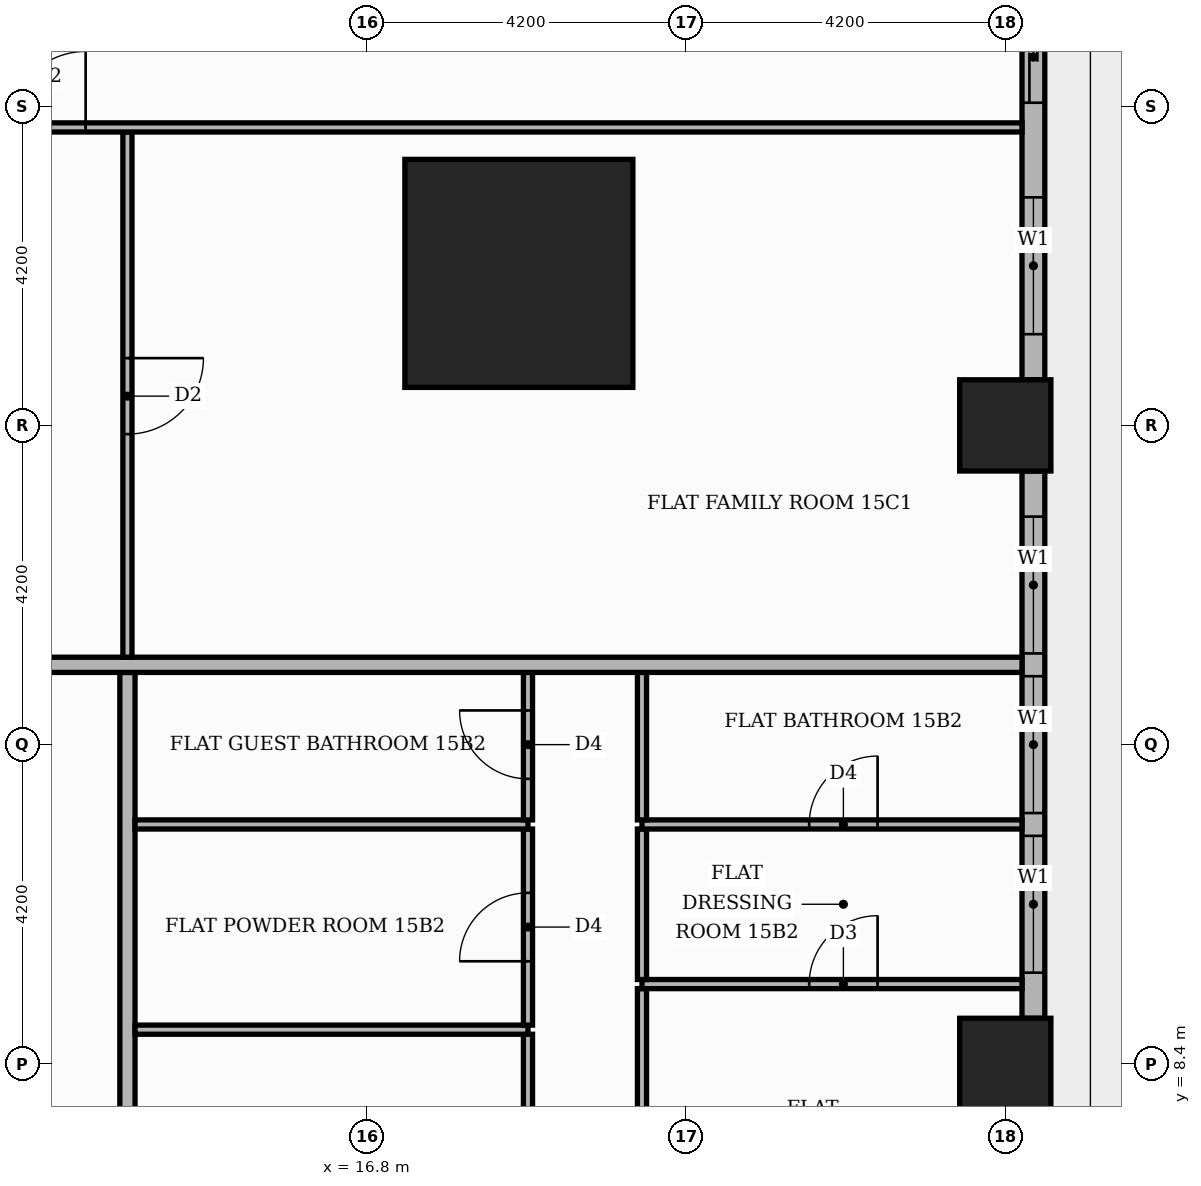
"""IFC4 building model, lengths in metres.
Left out: names, types, materials, properties, quantities, classifications, styles, units other than length and angle.
Written with IfcOpenShell. Run it as: python <this file> out.ifc"""

import sys

from ifc_helpers import new_model, si_unit, direction, frame, frame_2d, origin, origin_2d, place, context, subcontext, project, spatial, rectangle, extrude, element, fill, save


model = new_model("IFC4")
c1 = context("Model", 3, precision=1e-05, world=origin(), true_north=direction((0.0, 1.0)))
c2 = subcontext(c1, "Body", "Model", "MODEL_VIEW")
j1 = project(units=[si_unit("LENGTHUNIT", "METRE"), si_unit("PLANEANGLEUNIT", "RADIAN")], contexts=[c1])
p1 = place(None, origin())
s1 = spatial("IfcSite", under=j1, at=p1, CompositionType="ELEMENT")
p2 = place(p1, origin())
s2 = spatial("IfcBuilding", under=s1, at=p2, CompositionType="ELEMENT")
p3 = place(p2, frame((0.0, 0.0, 66.0)))
s3 = spatial("IfcBuildingStorey", under=s2, at=p3, CompositionType="ELEMENT", Elevation=66.0)
p4 = place(p3, frame((18.8, 18.8, 0.0), z_axis=(0.0, 0.0, 1.0), x_axis=(1.0, 0.0, 0.0)))
e1 = element("IfcColumn", 1, at=p4, inside=s3, PredefinedType="COLUMN", context=c2, shape_type="SweptSolid", body=[
    extrude(rectangle(XDim=3.0, YDim=3.0, at=origin_2d()), origin(), (0.0, 0.0, 1.0), 3.9),
])
for number, where, z_axis, x_axis in (
    (2, (25.2, 8.4, 0.0), (0.0, 0.0, 1.0), (1.0, 0.0, 0.0)),
    (3, (25.2, 16.8, 0.0), (0.0, 0.0, 1.0), (1.0, 0.0, 0.0)),
):
    element("IfcColumn", number, at=place(p3, frame(where, z_axis=z_axis, x_axis=x_axis)), inside=s3, PredefinedType="COLUMN", context=c2, shape_type="SweptSolid", body=[
        extrude(rectangle(XDim=1.2, YDim=1.2, at=origin_2d()), origin(), (0.0, 0.0, 1.0), 3.9),
    ])
p5 = place(p3, frame((25.57, 9.0, 0.0), z_axis=(0.0, 0.0, 1.0), x_axis=(0.0, 1.0, 0.0)))
e4 = element("IfcWall", 4, at=p5, inside=s3, PredefinedType="STANDARD", context=c2, shape_type="SweptSolid", body=[
    extrude(rectangle(XDim=7.2, YDim=0.3, at=frame_2d((3.6, 0.0))), origin(), (0.0, 0.0, 1.0), 3.48),
])
p6 = place(p5, frame((0.6, 0.0, 0.9)))
e5 = element("IfcOpeningElement", 5, at=p6, cuts=e4, PredefinedType="OPENING", context=c2, shape_type="SweptSolid", body=[
    extrude(rectangle(XDim=1.8, YDim=2.1, at=frame_2d((0.9, 1.05))), frame((0.0, 0.16, 0.0), z_axis=(0.0, -1.0, 0.0), x_axis=(1.0, 0.0, 0.0)), (0.0, 0.0, 1.0), 0.32),
])
p7 = place(p5, frame((2.7, 0.0, 0.9)))
e6 = element("IfcOpeningElement", 6, at=p7, cuts=e4, PredefinedType="OPENING", context=c2, shape_type="SweptSolid", body=[
    extrude(rectangle(XDim=1.8, YDim=2.1, at=frame_2d((0.9, 1.05))), frame((0.0, 0.16, 0.0), z_axis=(0.0, -1.0, 0.0), x_axis=(1.0, 0.0, 0.0)), (0.0, 0.0, 1.0), 0.32),
])
p8 = place(p5, frame((4.8, 0.0, 0.9)))
e7 = element("IfcOpeningElement", 7, at=p8, cuts=e4, PredefinedType="OPENING", context=c2, shape_type="SweptSolid", body=[
    extrude(rectangle(XDim=1.8, YDim=2.1, at=frame_2d((0.9, 1.05))), frame((0.0, 0.16, 0.0), z_axis=(0.0, -1.0, 0.0), x_axis=(1.0, 0.0, 0.0)), (0.0, 0.0, 1.0), 0.32),
])
p9 = place(p3, frame((25.57, 17.4, 0.0), z_axis=(0.0, 0.0, 1.0), x_axis=(0.0, 1.0, 0.0)))
e8 = element("IfcWall", 8, at=p9, inside=s3, PredefinedType="STANDARD", context=c2, shape_type="SweptSolid", body=[
    extrude(rectangle(XDim=5.32, YDim=0.3, at=frame_2d((2.66, 0.0))), origin(), (0.0, 0.0, 1.0), 3.48),
])
p10 = place(p9, frame((0.6, 0.0, 0.9)))
e9 = element("IfcOpeningElement", 9, at=p10, cuts=e8, PredefinedType="OPENING", context=c2, shape_type="SweptSolid", body=[
    extrude(rectangle(XDim=1.8, YDim=2.1, at=frame_2d((0.9, 1.05))), frame((0.0, 0.16, 0.0), z_axis=(0.0, -1.0, 0.0), x_axis=(1.0, 0.0, 0.0)), (0.0, 0.0, 1.0), 0.32),
])
p11 = place(p9, frame((3.645, 0.0, 0.0)))
e10 = element("IfcOpeningElement", 10, at=p11, cuts=e8, PredefinedType="OPENING", context=c2, shape_type="SweptSolid", body=[
    extrude(rectangle(XDim=1.2, YDim=2.4, at=frame_2d((0.6, 1.2))), frame((0.0, 0.16, 0.0), z_axis=(0.0, -1.0, 0.0), x_axis=(1.0, 0.0, 0.0)), (0.0, 0.0, 1.0), 0.32),
])
p12 = place(p3, frame((13.65, -5.15, 0.0), z_axis=(0.0, 0.0, 1.0), x_axis=(0.0, 1.0, 0.0)))
e11 = element("IfcWall", 11, at=p12, inside=s3, PredefinedType="PARTITIONING", context=c2, shape_type="SweptSolid", body=[
    extrude(rectangle(XDim=18.7, YDim=0.2, at=frame_2d((9.35, 0.0))), origin(), (0.0, 0.0, 1.0), 3.48),
])
p13 = place(p12, frame((5.65, 0.0, 0.0)))
e12 = element("IfcOpeningElement", 12, at=p13, cuts=e11, PredefinedType="OPENING", context=c2, shape_type="SweptSolid", body=[
    extrude(rectangle(XDim=1.1, YDim=2.4, at=frame_2d((0.55, 1.2))), frame((0.0, 0.11, 0.0), z_axis=(0.0, -1.0, 0.0), x_axis=(1.0, 0.0, 0.0)), (0.0, 0.0, 1.0), 0.22),
])
p14 = place(p3, frame((18.92, 3.21, 0.0), z_axis=(0.0, 0.0, 1.0), x_axis=(0.0, 1.0, 0.0)))
e13 = element("IfcWall", 13, at=p14, inside=s3, PredefinedType="PARTITIONING", context=c2, shape_type="SweptSolid", body=[
    extrude(rectangle(XDim=5.58, YDim=0.12, at=frame_2d((2.79, 0.0))), origin(), (0.0, 0.0, 1.0), 3.48),
])
p15 = place(p14, frame((2.34, 0.0, 0.0)))
e14 = element("IfcOpeningElement", 14, at=p15, cuts=e13, PredefinedType="OPENING", context=c2, shape_type="SweptSolid", body=[
    extrude(rectangle(XDim=0.9, YDim=2.1, at=frame_2d((0.45, 1.05))), frame((0.0, 0.07, 0.0), z_axis=(0.0, -1.0, 0.0), x_axis=(1.0, 0.0, 0.0)), (0.0, 0.0, 1.0), 0.14),
])
p16 = place(p3, frame((20.42, 5.31, 0.0), z_axis=(0.0, 0.0, 1.0), x_axis=(0.0, 1.0, 0.0)))
e15 = element("IfcWall", 15, at=p16, inside=s3, PredefinedType="PARTITIONING", context=c2, shape_type="SweptSolid", body=[
    extrude(rectangle(XDim=4.08, YDim=0.12, at=frame_2d((2.04, 0.0))), origin(), (0.0, 0.0, 1.0), 3.48),
])
p17 = place(p16, frame((1.59, 0.0, 0.0)))
e16 = element("IfcOpeningElement", 16, at=p17, cuts=e15, PredefinedType="OPENING", context=c2, shape_type="SweptSolid", body=[
    extrude(rectangle(XDim=0.9, YDim=2.1, at=frame_2d((0.45, 1.05))), frame((0.0, 0.07, 0.0), z_axis=(0.0, -1.0, 0.0), x_axis=(1.0, 0.0, 0.0)), (0.0, 0.0, 1.0), 0.14),
])
p18 = place(p3, frame((13.75, 8.85, 0.0), z_axis=(0.0, 0.0, 1.0), x_axis=(1.0, 0.0, 0.0)))
e17 = element("IfcWall", 17, at=p18, inside=s3, PredefinedType="PARTITIONING", context=c2, shape_type="SweptSolid", body=[
    extrude(rectangle(XDim=5.17, YDim=0.12, at=frame_2d((2.585, 0.0))), origin(), (0.0, 0.0, 1.0), 3.48),
])
p19 = place(p3, frame((18.92, 8.91, 0.0), z_axis=(0.0, 0.0, 1.0), x_axis=(0.0, 1.0, 0.0)))
e18 = element("IfcWall", 18, at=p19, inside=s3, PredefinedType="PARTITIONING", context=c2, shape_type="SweptSolid", body=[
    extrude(rectangle(XDim=2.58, YDim=0.12, at=frame_2d((1.29, 0.0))), origin(), (0.0, 0.0, 1.0), 3.48),
])
p20 = place(p19, frame((0.84, 0.0, 0.0)))
e19 = element("IfcOpeningElement", 19, at=p20, cuts=e18, PredefinedType="OPENING", context=c2, shape_type="SweptSolid", body=[
    extrude(rectangle(XDim=0.9, YDim=2.1, at=frame_2d((0.45, 1.05))), frame((0.0, 0.07, 0.0), z_axis=(0.0, -1.0, 0.0), x_axis=(1.0, 0.0, 0.0)), (0.0, 0.0, 1.0), 0.14),
])
p21 = place(p3, frame((20.42, 9.45, 0.0), z_axis=(0.0, 0.0, 1.0), x_axis=(1.0, 0.0, 0.0)))
e20 = element("IfcWall", 20, at=p21, inside=s3, PredefinedType="PARTITIONING", context=c2, shape_type="SweptSolid", body=[
    extrude(rectangle(XDim=5.0, YDim=0.12, at=frame_2d((2.5, 0.0))), origin(), (0.0, 0.0, 1.0), 3.48),
])
p22 = place(p21, frame((2.2, 0.0, 0.0)))
e21 = element("IfcOpeningElement", 21, at=p22, cuts=e20, PredefinedType="OPENING", context=c2, shape_type="SweptSolid", body=[
    extrude(rectangle(XDim=0.9, YDim=2.1, at=frame_2d((0.45, 1.05))), frame((0.0, 0.07, 0.0), z_axis=(0.0, -1.0, 0.0), x_axis=(1.0, 0.0, 0.0)), (0.0, 0.0, 1.0), 0.14),
])
p23 = place(p3, frame((20.42, 9.51, 0.0), z_axis=(0.0, 0.0, 1.0), x_axis=(0.0, 1.0, 0.0)))
e22 = element("IfcWall", 22, at=p23, inside=s3, PredefinedType="PARTITIONING", context=c2, shape_type="SweptSolid", body=[
    extrude(rectangle(XDim=1.98, YDim=0.12, at=frame_2d((0.99, 0.0))), origin(), (0.0, 0.0, 1.0), 3.48),
])
p24 = place(p3, frame((13.75, 11.55, 0.0), z_axis=(0.0, 0.0, 1.0), x_axis=(1.0, 0.0, 0.0)))
e23 = element("IfcWall", 23, at=p24, inside=s3, PredefinedType="PARTITIONING", context=c2, shape_type="SweptSolid", body=[
    extrude(rectangle(XDim=5.17, YDim=0.12, at=frame_2d((2.585, 0.0))), origin(), (0.0, 0.0, 1.0), 3.48),
])
p25 = place(p3, frame((20.42, 11.55, 0.0), z_axis=(0.0, 0.0, 1.0), x_axis=(1.0, 0.0, 0.0)))
e24 = element("IfcWall", 24, at=p25, inside=s3, PredefinedType="PARTITIONING", context=c2, shape_type="SweptSolid", body=[
    extrude(rectangle(XDim=5.0, YDim=0.12, at=frame_2d((2.5, 0.0))), origin(), (0.0, 0.0, 1.0), 3.48),
])
p26 = place(p25, frame((2.2, 0.0, 0.0)))
e25 = element("IfcOpeningElement", 25, at=p26, cuts=e24, PredefinedType="OPENING", context=c2, shape_type="SweptSolid", body=[
    extrude(rectangle(XDim=0.9, YDim=2.1, at=frame_2d((0.45, 1.05))), frame((0.0, 0.07, 0.0), z_axis=(0.0, -1.0, 0.0), x_axis=(1.0, 0.0, 0.0)), (0.0, 0.0, 1.0), 0.14),
])
p27 = place(p3, frame((18.92, 11.61, 0.0), z_axis=(0.0, 0.0, 1.0), x_axis=(0.0, 1.0, 0.0)))
e26 = element("IfcWall", 26, at=p27, inside=s3, PredefinedType="PARTITIONING", context=c2, shape_type="SweptSolid", body=[
    extrude(rectangle(XDim=1.94, YDim=0.12, at=frame_2d((0.97, 0.0))), origin(), (0.0, 0.0, 1.0), 3.48),
])
p28 = place(p27, frame((0.54, 0.0, 0.0)))
e27 = element("IfcOpeningElement", 27, at=p28, cuts=e26, PredefinedType="OPENING", context=c2, shape_type="SweptSolid", body=[
    extrude(rectangle(XDim=0.9, YDim=2.1, at=frame_2d((0.45, 1.05))), frame((0.0, 0.07, 0.0), z_axis=(0.0, -1.0, 0.0), x_axis=(1.0, 0.0, 0.0)), (0.0, 0.0, 1.0), 0.14),
])
p29 = place(p3, frame((20.42, 11.61, 0.0), z_axis=(0.0, 0.0, 1.0), x_axis=(0.0, 1.0, 0.0)))
e28 = element("IfcWall", 28, at=p29, inside=s3, PredefinedType="PARTITIONING", context=c2, shape_type="SweptSolid", body=[
    extrude(rectangle(XDim=1.94, YDim=0.12, at=frame_2d((0.97, 0.0))), origin(), (0.0, 0.0, 1.0), 3.48),
])
p30 = place(p3, frame((-13.65, 13.65, 0.0), z_axis=(0.0, 0.0, 1.0), x_axis=(1.0, 0.0, 0.0)))
e29 = element("IfcWall", 29, at=p30, inside=s3, PredefinedType="PARTITIONING", context=c2, shape_type="SweptSolid", body=[
    extrude(rectangle(XDim=39.07, YDim=0.2, at=frame_2d((19.535, 0.0))), origin(), (0.0, 0.0, 1.0), 3.48),
])
p31 = place(p30, frame((23.6, 0.0, 0.0)))
e30 = element("IfcOpeningElement", 30, at=p31, cuts=e29, PredefinedType="OPENING", context=c2, shape_type="SweptSolid", body=[
    extrude(rectangle(XDim=1.1, YDim=2.4, at=frame_2d((0.55, 1.2))), frame((0.0, 0.11, 0.0), z_axis=(0.0, -1.0, 0.0), x_axis=(1.0, 0.0, 0.0)), (0.0, 0.0, 1.0), 0.22),
])
p32 = place(p3, frame((13.65, 13.75, 0.0), z_axis=(0.0, 0.0, 1.0), x_axis=(0.0, 1.0, 0.0)))
e31 = element("IfcWall", 31, at=p32, inside=s3, PredefinedType="PARTITIONING", context=c2, shape_type="SweptSolid", body=[
    extrude(rectangle(XDim=6.91, YDim=0.12, at=frame_2d((3.455, 0.0))), origin(), (0.0, 0.0, 1.0), 3.48),
])
p33 = place(p32, frame((2.935, 0.0, 0.0)))
e32 = element("IfcOpeningElement", 32, at=p33, cuts=e31, PredefinedType="OPENING", context=c2, shape_type="SweptSolid", body=[
    extrude(rectangle(XDim=1.0, YDim=2.1, at=frame_2d((0.5, 1.05))), frame((0.0, 0.07, 0.0), z_axis=(0.0, -1.0, 0.0), x_axis=(1.0, 0.0, 0.0)), (0.0, 0.0, 1.0), 0.14),
])
p34 = place(p3, frame((-13.55, 20.72, 0.0), z_axis=(0.0, 0.0, 1.0), x_axis=(1.0, 0.0, 0.0)))
e33 = element("IfcWall", 33, at=p34, inside=s3, PredefinedType="PARTITIONING", context=c2, shape_type="SweptSolid", body=[
    extrude(rectangle(XDim=38.97, YDim=0.12, at=frame_2d((19.485, 0.0))), origin(), (0.0, 0.0, 1.0), 3.48),
])
p35 = place(p34, frame((25.65, 0.0, 0.0)))
e34 = element("IfcOpeningElement", 34, at=p35, cuts=e33, PredefinedType="OPENING", context=c2, shape_type="SweptSolid", body=[
    extrude(rectangle(XDim=1.0, YDim=2.1, at=frame_2d((0.5, 1.05))), frame((0.0, 0.07, 0.0), z_axis=(0.0, -1.0, 0.0), x_axis=(1.0, 0.0, 0.0)), (0.0, 0.0, 1.0), 0.14),
])
p36 = place(p34, frame((20.45, 0.0, 0.0)))
e35 = element("IfcOpeningElement", 35, at=p36, cuts=e33, PredefinedType="OPENING", context=c2, shape_type="SweptSolid", body=[
    extrude(rectangle(XDim=0.9, YDim=2.1, at=frame_2d((0.45, 1.05))), frame((0.0, 0.07, 0.0), z_axis=(0.0, -1.0, 0.0), x_axis=(1.0, 0.0, 0.0)), (0.0, 0.0, 1.0), 0.14),
])
p37 = place(p34, frame((9.95, 0.0, 0.0)))
e36 = element("IfcOpeningElement", 36, at=p37, cuts=e33, PredefinedType="OPENING", context=c2, shape_type="SweptSolid", body=[
    extrude(rectangle(XDim=0.9, YDim=2.1, at=frame_2d((0.45, 1.05))), frame((0.0, 0.07, 0.0), z_axis=(0.0, -1.0, 0.0), x_axis=(1.0, 0.0, 0.0)), (0.0, 0.0, 1.0), 0.14),
])
p38 = place(p34, frame((2.6, 0.0, 0.0)))
e37 = element("IfcOpeningElement", 37, at=p38, cuts=e33, PredefinedType="OPENING", context=c2, shape_type="SweptSolid", body=[
    extrude(rectangle(XDim=0.9, YDim=2.1, at=frame_2d((0.45, 1.05))), frame((0.0, 0.07, 0.0), z_axis=(0.0, -1.0, 0.0), x_axis=(1.0, 0.0, 0.0)), (0.0, 0.0, 1.0), 0.14),
])
p39 = place(p6, origin())
e38 = element("IfcWindow", 38, at=p39, inside=s3, PartitioningType="SINGLE_PANEL", PredefinedType="WINDOW", context=c2, shape_type="SweptSolid", body=[
    extrude(rectangle(XDim=1.8, YDim=2.1, at=frame_2d((0.9, 1.05))), frame((0.0, 0.03, 0.0), z_axis=(0.0, -1.0, 0.0), x_axis=(1.0, 0.0, 0.0)), (0.0, 0.0, 1.0), 0.06),
])
fill(e5, e38)
p40 = place(p7, origin())
e39 = element("IfcWindow", 39, at=p40, inside=s3, PartitioningType="SINGLE_PANEL", PredefinedType="WINDOW", context=c2, shape_type="SweptSolid", body=[
    extrude(rectangle(XDim=1.8, YDim=2.1, at=frame_2d((0.9, 1.05))), frame((0.0, 0.03, 0.0), z_axis=(0.0, -1.0, 0.0), x_axis=(1.0, 0.0, 0.0)), (0.0, 0.0, 1.0), 0.06),
])
fill(e6, e39)
p41 = place(p8, origin())
e40 = element("IfcWindow", 40, at=p41, inside=s3, PartitioningType="SINGLE_PANEL", PredefinedType="WINDOW", context=c2, shape_type="SweptSolid", body=[
    extrude(rectangle(XDim=1.8, YDim=2.1, at=frame_2d((0.9, 1.05))), frame((0.0, 0.03, 0.0), z_axis=(0.0, -1.0, 0.0), x_axis=(1.0, 0.0, 0.0)), (0.0, 0.0, 1.0), 0.06),
])
fill(e7, e40)
p42 = place(p10, origin())
e41 = element("IfcWindow", 41, at=p42, inside=s3, PartitioningType="SINGLE_PANEL", PredefinedType="WINDOW", context=c2, shape_type="SweptSolid", body=[
    extrude(rectangle(XDim=1.8, YDim=2.1, at=frame_2d((0.9, 1.05))), frame((0.0, 0.03, 0.0), z_axis=(0.0, -1.0, 0.0), x_axis=(1.0, 0.0, 0.0)), (0.0, 0.0, 1.0), 0.06),
])
fill(e9, e41)
p43 = place(p11, origin())
e42 = element("IfcDoor", 42, at=p43, inside=s3, OperationType="SLIDING_TO_RIGHT", PredefinedType="DOOR", context=c2, shape_type="SweptSolid", body=[
    extrude(rectangle(XDim=1.2, YDim=2.4, at=frame_2d((0.6, 1.2))), frame((0.0, 0.025, 0.0), z_axis=(0.0, -1.0, 0.0), x_axis=(1.0, 0.0, 0.0)), (0.0, 0.0, 1.0), 0.05),
])
fill(e10, e42)
p44 = place(p20, origin())
e43 = element("IfcDoor", 43, at=p44, inside=s3, OperationType="SINGLE_SWING_LEFT", PredefinedType="DOOR", context=c2, shape_type="SweptSolid", body=[
    extrude(rectangle(XDim=0.9, YDim=2.1, at=frame_2d((0.45, 1.05))), frame((0.0, 0.025, 0.0), z_axis=(0.0, -1.0, 0.0), x_axis=(1.0, 0.0, 0.0)), (0.0, 0.0, 1.0), 0.05),
])
fill(e19, e43)
p45 = place(p28, origin())
e44 = element("IfcDoor", 44, at=p45, inside=s3, OperationType="SINGLE_SWING_RIGHT", PredefinedType="DOOR", context=c2, shape_type="SweptSolid", body=[
    extrude(rectangle(XDim=0.9, YDim=2.1, at=frame_2d((0.45, 1.05))), frame((0.0, 0.025, 0.0), z_axis=(0.0, -1.0, 0.0), x_axis=(1.0, 0.0, 0.0)), (0.0, 0.0, 1.0), 0.05),
])
fill(e27, e44)
p46 = place(p22, origin())
e45 = element("IfcDoor", 45, at=p46, inside=s3, OperationType="SINGLE_SWING_RIGHT", PredefinedType="DOOR", context=c2, shape_type="SweptSolid", body=[
    extrude(rectangle(XDim=0.9, YDim=2.1, at=frame_2d((0.45, 1.05))), frame((0.0, 0.025, 0.0), z_axis=(0.0, -1.0, 0.0), x_axis=(1.0, 0.0, 0.0)), (0.0, 0.0, 1.0), 0.05),
])
fill(e21, e45)
p47 = place(p26, origin())
e46 = element("IfcDoor", 46, at=p47, inside=s3, OperationType="SINGLE_SWING_RIGHT", PredefinedType="DOOR", context=c2, shape_type="SweptSolid", body=[
    extrude(rectangle(XDim=0.9, YDim=2.1, at=frame_2d((0.45, 1.05))), frame((0.0, 0.025, 0.0), z_axis=(0.0, -1.0, 0.0), x_axis=(1.0, 0.0, 0.0)), (0.0, 0.0, 1.0), 0.05),
])
fill(e25, e46)
p48 = place(p33, frame((1.0, 0.0, 0.0), z_axis=(0.0, 0.0, 1.0), x_axis=(-1.0, 0.0, 0.0)))
e47 = element("IfcDoor", 47, at=p48, inside=s3, OperationType="SINGLE_SWING_RIGHT", PredefinedType="DOOR", context=c2, shape_type="SweptSolid", body=[
    extrude(rectangle(XDim=1.0, YDim=2.1, at=frame_2d((0.5, 1.05))), frame((0.0, 0.025, 0.0), z_axis=(0.0, -1.0, 0.0), x_axis=(1.0, 0.0, 0.0)), (0.0, 0.0, 1.0), 0.05),
])
fill(e32, e47)
p49 = place(p35, origin())
e48 = element("IfcDoor", 48, at=p49, inside=s3, OperationType="SINGLE_SWING_RIGHT", PredefinedType="DOOR", context=c2, shape_type="SweptSolid", body=[
    extrude(rectangle(XDim=1.0, YDim=2.1, at=frame_2d((0.5, 1.05))), frame((0.0, 0.025, 0.0), z_axis=(0.0, -1.0, 0.0), x_axis=(1.0, 0.0, 0.0)), (0.0, 0.0, 1.0), 0.05),
])
fill(e34, e48)
save(model, sys.argv[1])
